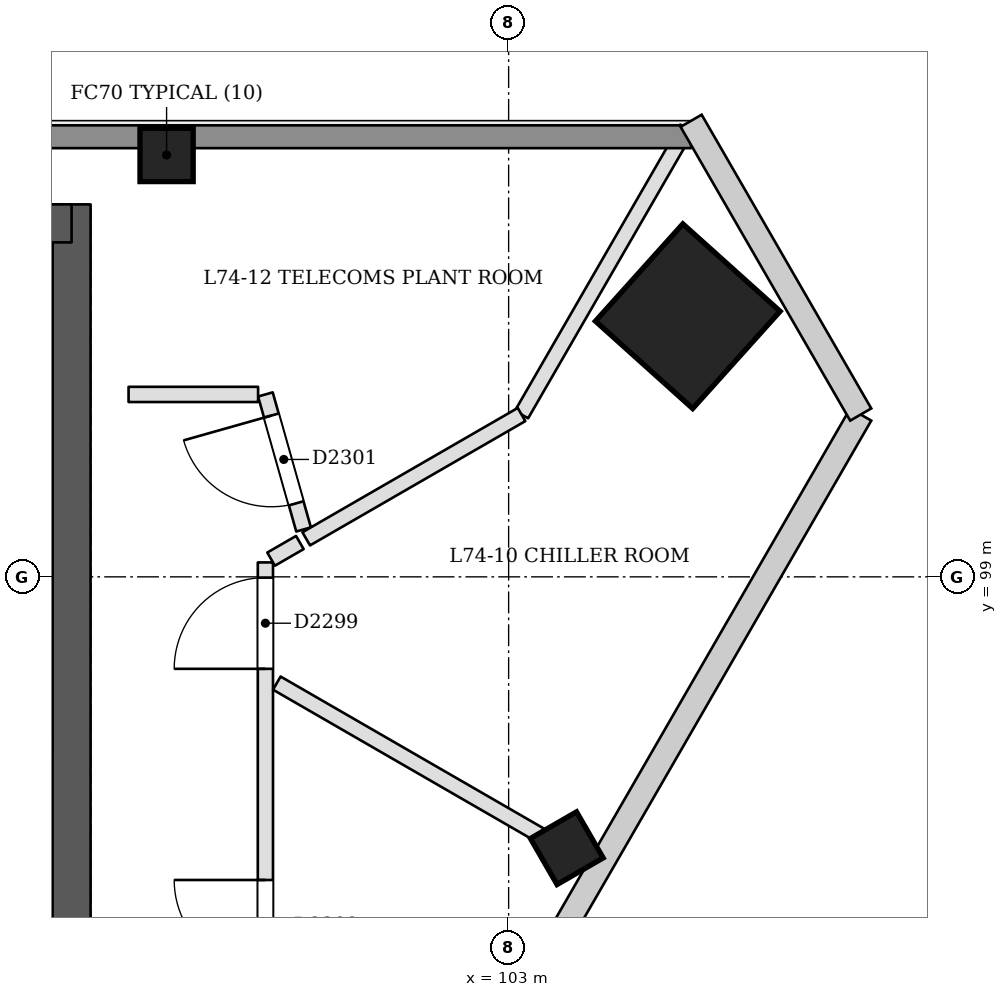
"""IFC4 building model, lengths in metres.
Left out: names, types, materials, properties, quantities, classifications, styles, units other than length and angle.
Written with IfcOpenShell. Run it as: python <this file> out.ifc"""

import sys

from ifc_helpers import new_model, si_unit, direction, frame, frame_2d, origin, origin_2d, place, context, subcontext, project, spatial, rectangle, extrude, element, fill, save


model = new_model("IFC4")
c1 = context("Model", 3, precision=1e-05, world=origin(), true_north=direction((0.0, 1.0)))
c2 = subcontext(c1, "Body", "Model", "MODEL_VIEW")
j1 = project(units=[si_unit("LENGTHUNIT", "METRE"), si_unit("PLANEANGLEUNIT", "RADIAN")], contexts=[c1])
p1 = place(None, origin())
s1 = spatial("IfcSite", under=j1, at=p1, CompositionType="ELEMENT")
p2 = place(p1, origin())
s2 = spatial("IfcBuilding", under=s1, at=p2, CompositionType="ELEMENT")
p3 = place(p2, frame((0.0, 0.0, 286.0)))
s3 = spatial("IfcBuildingStorey", under=s2, at=p3, CompositionType="ELEMENT", Elevation=286.0)
p4 = place(p3, frame((97.25, 93.15, 0.0), z_axis=(0.0, 0.0, 1.0), x_axis=(0.0, 1.0, 0.0)))
e1 = element("IfcWall", 1, at=p4, inside=s3, PredefinedType="SHEAR", context=c2, shape_type="SweptSolid", body=[
    extrude(rectangle(XDim=10.75, YDim=0.5, at=frame_2d((5.375, 0.0))), origin(), (0.0, 0.0, 1.0), 5.4),
])
p5 = place(p3, frame((97.25, 103.65, 0.0), z_axis=(0.0, 0.0, 1.0), x_axis=(-1.0, 0.0, 0.0)))
e2 = element("IfcWall", 2, at=p5, inside=s3, PredefinedType="SHEAR", context=c2, shape_type="SweptSolid", body=[
    extrude(rectangle(XDim=24.75, YDim=0.5, at=frame_2d((12.375, 0.0))), origin(), (0.0, 0.0, 1.0), 5.4),
])
p6 = place(p3, frame((105.391, 102.418, 0.0), z_axis=(-0.028425663377, 0.009264325902, 0.999552977049), x_axis=(0.499715911209, -0.86590388422, 0.02223671238)))
e3 = element("IfcColumn", 3, at=p6, inside=s3, PredefinedType="COLUMN", context=c2, shape_type="SweptSolid", body=[
    extrude(rectangle(XDim=1.72, YDim=1.72, at=origin_2d()), origin(), (0.0, 0.0, 1.0), 5.402),
])
p7 = place(p3, frame((98.5, 104.55, 0.0), z_axis=(0.0, 0.0, 1.0), x_axis=(1.0, 0.0, 0.0)))
e4 = element("IfcColumn", 4, at=p7, inside=s3, PredefinedType="COLUMN", context=c2, shape_type="SweptSolid", body=[
    extrude(rectangle(XDim=0.7, YDim=0.7, at=origin_2d()), origin(), (0.0, 0.0, 1.0), 5.4),
])
p8 = place(p3, frame((103.792, 95.384, 0.0), z_axis=(-0.02217724499, 0.038437546816, 0.999014877166), x_axis=(-0.500497631239, -0.86545352787, 0.022188109923)))
e5 = element("IfcColumn", 5, at=p8, inside=s3, PredefinedType="COLUMN", context=c2, shape_type="SweptSolid", body=[
    extrude(rectangle(XDim=0.7, YDim=0.7, at=origin_2d()), origin(), (0.0, 0.0, 1.0), 5.405),
])
p9 = place(p3, frame((99.8, 90.2, 0.0), z_axis=(0.0, 0.0, 1.0), x_axis=(0.0, 1.0, 0.0)))
e6 = element("IfcWall", 6, at=p9, inside=s3, PredefinedType="PARTITIONING", context=c2, shape_type="SweptSolid", body=[
    extrude(rectangle(XDim=8.99, YDim=0.2, at=frame_2d((4.495, 0.0))), origin(), (0.0, 0.0, 1.0), 5.0),
])
p10 = place(p9, frame((3.612, 0.0, 0.0)))
e7 = element("IfcOpeningElement", 7, at=p10, cuts=e6, PredefinedType="OPENING", context=c2, shape_type="SweptSolid", body=[
    extrude(rectangle(XDim=1.2, YDim=2.4, at=frame_2d((0.6, 1.2))), frame((0.0, 0.11, 0.0), z_axis=(0.0, -1.0, 0.0), x_axis=(1.0, 0.0, 0.0)), (0.0, 0.0, 1.0), 0.221),
])
p11 = place(p9, frame((7.59, 0.0, 0.0)))
e8 = element("IfcOpeningElement", 8, at=p11, cuts=e6, PredefinedType="OPENING", context=c2, shape_type="SweptSolid", body=[
    extrude(rectangle(XDim=1.2, YDim=2.4, at=frame_2d((0.6, 1.2))), frame((0.0, 0.11, 0.0), z_axis=(0.0, -1.0, 0.0), x_axis=(1.0, 0.0, 0.0)), (0.0, 0.0, 1.0), 0.221),
])
p12 = place(p3, frame((99.875, 99.233, 0.0), z_axis=(0.0, 0.0, 1.0), x_axis=(0.866101796549, 0.4998676605, 0.0)))
e9 = element("IfcWall", 9, at=p12, inside=s3, PredefinedType="PARTITIONING", context=c2, shape_type="SweptSolid", body=[
    extrude(rectangle(XDim=0.437, YDim=0.2, at=frame_2d((0.218, 0.0))), origin(), (0.0, 0.0, 1.0), 5.0),
])
p13 = place(p3, frame((100.302, 99.624, 0.0), z_axis=(0.0, 0.0, 1.0), x_axis=(-0.27204752746, 0.962283816139, 0.0)))
e10 = element("IfcWall", 10, at=p13, inside=s3, PredefinedType="PARTITIONING", context=c2, shape_type="SweptSolid", body=[
    extrude(rectangle(XDim=1.846, YDim=0.2, at=frame_2d((0.923, 0.0))), origin(), (0.0, 0.0, 1.0), 5.0),
])
p14 = place(p13, frame((0.357, 0.0, 0.0)))
e11 = element("IfcOpeningElement", 11, at=p14, cuts=e10, PredefinedType="OPENING", context=c2, shape_type="SweptSolid", body=[
    extrude(rectangle(XDim=1.2, YDim=2.4, at=frame_2d((0.6, 1.2))), frame((0.0, 0.11, 0.0), z_axis=(0.0, -1.0, 0.0), x_axis=(1.0, 0.0, 0.0)), (0.0, 0.0, 1.0), 0.221),
])
p15 = place(p3, frame((99.704, 101.4, 0.0), z_axis=(0.0, 0.0, 1.0), x_axis=(-1.0, 0.0, 0.0)))
e12 = element("IfcWall", 12, at=p15, inside=s3, PredefinedType="PARTITIONING", context=c2, shape_type="SweptSolid", body=[
    extrude(rectangle(XDim=1.704, YDim=0.2, at=frame_2d((0.852, 0.0))), origin(), (0.0, 0.0, 1.0), 5.0),
])
p16 = place(p3, frame((104.095, 95.209, 0.0), z_axis=(0.0, 0.0, 1.0), x_axis=(-0.86604373993, 0.499968239519, 0.0)))
e13 = element("IfcWall", 13, at=p16, inside=s3, PredefinedType="PARTITIONING", context=c2, shape_type="SweptSolid", body=[
    extrude(rectangle(XDim=4.786, YDim=0.2, at=frame_2d((2.393, 0.0))), origin(), (0.0, 0.0, 1.0), 5.0),
])
p17 = place(p3, frame((105.343, 104.9, 0.0), z_axis=(0.0, 0.0, 1.0), x_axis=(-0.500035223315, -0.866005066639, 0.0)))
e14 = element("IfcWall", 14, at=p17, inside=s3, PredefinedType="PARTITIONING", context=c2, shape_type="SweptSolid", body=[
    extrude(rectangle(XDim=4.347, YDim=0.2, at=frame_2d((2.173, 0.0))), origin(), (0.0, 0.0, 1.0), 5.0),
])
p18 = place(p3, frame((103.17, 101.135, 0.0), z_axis=(0.0, 0.0, 1.0), x_axis=(-0.866006586452, -0.50003259116, 0.0)))
e15 = element("IfcWall", 15, at=p18, inside=s3, PredefinedType="PARTITIONING", context=c2, shape_type="SweptSolid", body=[
    extrude(rectangle(XDim=3.271, YDim=0.2, at=frame_2d((1.635, 0.0))), origin(), (0.0, 0.0, 1.0), 5.0),
])
p19 = place(p3, frame((64.599, 104.79, 0.0), z_axis=(0.0, 0.0, 1.0), x_axis=(1.0, 0.0, 0.0)))
e16 = element("IfcWall", 16, at=p19, inside=s3, PredefinedType="SOLIDWALL", context=c2, shape_type="SweptSolid", body=[
    extrude(rectangle(XDim=40.802, YDim=0.3, at=frame_2d((20.401, 0.0))), origin(), (0.0, 0.0, 1.0), 5.0),
])
p20 = place(p10, origin())
e17 = element("IfcDoor", 17, at=p20, inside=s3, OperationType="SINGLE_SWING_RIGHT", PredefinedType="NOTDEFINED", context=c2, shape_type="SweptSolid", body=[
    extrude(rectangle(XDim=1.2, YDim=2.4, at=frame_2d((0.6, 1.2))), frame((0.0, 0.025, 0.0), z_axis=(0.0, -1.0, 0.0), x_axis=(1.0, 0.0, 0.0)), (0.0, 0.0, 1.0), 0.05),
])
fill(e7, e17)
p21 = place(p11, origin())
e18 = element("IfcDoor", 18, at=p21, inside=s3, OperationType="SINGLE_SWING_LEFT", PredefinedType="NOTDEFINED", context=c2, shape_type="SweptSolid", body=[
    extrude(rectangle(XDim=1.2, YDim=2.4, at=frame_2d((0.6, 1.2))), frame((0.0, 0.025, 0.0), z_axis=(0.0, -1.0, 0.0), x_axis=(1.0, 0.0, 0.0)), (0.0, 0.0, 1.0), 0.05),
])
fill(e8, e18)
p22 = place(p14, origin())
e19 = element("IfcDoor", 19, at=p22, inside=s3, OperationType="SINGLE_SWING_RIGHT", PredefinedType="NOTDEFINED", context=c2, shape_type="SweptSolid", body=[
    extrude(rectangle(XDim=1.2, YDim=2.4, at=frame_2d((0.6, 1.2))), frame((0.0, 0.025, 0.0), z_axis=(0.0, -1.0, 0.0), x_axis=(1.0, 0.0, 0.0)), (0.0, 0.0, 1.0), 0.05),
])
fill(e11, e19)
save(model, sys.argv[1])
